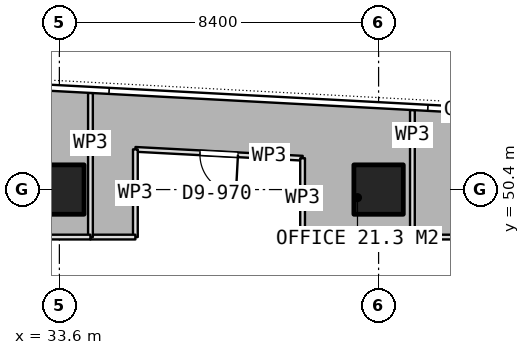
"""IFC4 building model, lengths in metres.
Left out: names, types, materials, properties, quantities, classifications, styles, units other than length and angle.
Written with IfcOpenShell. Run it as: python <this file> out.ifc"""

import sys

from ifc_helpers import new_model, si_unit, direction, frame, frame_2d, origin, origin_2d, place, context, subcontext, project, spatial, rectangle, extrude, element, fill, save


model = new_model("IFC4")
c1 = context("Model", 3, precision=1e-05, world=origin(), true_north=direction((0.0, 1.0)))
c2 = subcontext(c1, "Body", "Model", "MODEL_VIEW")
j1 = project(units=[si_unit("LENGTHUNIT", "METRE"), si_unit("PLANEANGLEUNIT", "RADIAN")], contexts=[c1])
p1 = place(None, origin())
s1 = spatial("IfcSite", under=j1, at=p1, CompositionType="ELEMENT")
p2 = place(p1, origin())
s2 = spatial("IfcBuilding", under=s1, at=p2, CompositionType="ELEMENT")
p3 = place(p2, frame((0.0, 0.0, 257.6)))
s3 = spatial("IfcBuildingStorey", under=s2, at=p3, CompositionType="ELEMENT", Elevation=257.6)
for number, where, z_axis, x_axis in (
    (1, (33.6, 50.4, 0.0), (0.0, 0.0, 1.0), (1.0, 0.0, 0.0)),
    (2, (42.0, 50.4, 0.0), (0.0, 0.0, 1.0), (1.0, 0.0, 0.0)),
):
    element("IfcColumn", number, at=place(p3, frame(where, z_axis=z_axis, x_axis=x_axis)), inside=s3, PredefinedType="COLUMN", context=c2, shape_type="SweptSolid", body=[
        extrude(rectangle(XDim=1.3, YDim=1.3, at=origin_2d()), origin(), (0.0, 0.0, 1.0), 3.75),
    ])
p4 = place(p3, frame((50.402, 49.15, 0.0), z_axis=(0.0, 0.0, 1.0), x_axis=(-1.0, 0.0, 0.0)))
e3 = element("IfcWall", 3, at=p4, inside=s3, PredefinedType="PARTITIONING", context=c2, shape_type="SweptSolid", body=[
    extrude(rectangle(XDim=7.512, YDim=0.125, at=frame_2d((3.756, 0.0))), origin(), (0.0, 0.0, 1.0), 3.5),
])
p5 = place(p4, frame((3.256, 0.0, 0.0)))
e4 = element("IfcOpeningElement", 4, at=p5, cuts=e3, PredefinedType="OPENING", context=c2, shape_type="SweptSolid", body=[
    extrude(rectangle(XDim=1.0, YDim=2.1, at=frame_2d((0.5, 1.05))), frame((0.0, 0.073, 0.0), z_axis=(0.0, -1.0, 0.0), x_axis=(1.0, 0.0, 0.0)), (0.0, 0.0, 1.0), 0.145),
])
p6 = place(p3, frame((42.89, 49.15, 0.0), z_axis=(0.0, 0.0, 1.0), x_axis=(0.0, 1.0, 0.0)))
e5 = element("IfcWall", 5, at=p6, inside=s3, PredefinedType="PARTITIONING", context=c2, shape_type="SweptSolid", body=[
    extrude(rectangle(XDim=3.343, YDim=0.125, at=frame_2d((1.671, 0.0))), origin(), (0.0, 0.0, 1.0), 3.5),
])
p7 = place(p3, frame((40.0, 51.225, 0.0), z_axis=(0.0, 0.0, 1.0), x_axis=(-0.998601864588, 0.052861290579, 0.0)))
e6 = element("IfcWall", 6, at=p7, inside=s3, PredefinedType="PARTITIONING", context=c2, shape_type="SweptSolid", body=[
    extrude(rectangle(XDim=4.406, YDim=0.125, at=frame_2d((2.203, 0.0))), origin(), (0.0, 0.0, 1.0), 3.5),
])
p8 = place(p7, frame((1.703, 0.0, 0.0)))
e7 = element("IfcOpeningElement", 7, at=p8, cuts=e6, PredefinedType="OPENING", context=c2, shape_type="SweptSolid", body=[
    extrude(rectangle(XDim=1.0, YDim=2.1, at=frame_2d((0.5, 1.05))), frame((0.0, 0.073, 0.0), z_axis=(0.0, -1.0, 0.0), x_axis=(1.0, 0.0, 0.0)), (0.0, 0.0, 1.0), 0.145),
])
p9 = place(p3, frame((35.6, 51.458, 0.0), z_axis=(0.0, 0.0, 1.0), x_axis=(0.0, -1.0, 0.0)))
e8 = element("IfcWall", 8, at=p9, inside=s3, PredefinedType="PARTITIONING", context=c2, shape_type="SweptSolid", body=[
    extrude(rectangle(XDim=2.308, YDim=0.125, at=frame_2d((1.154, 0.0))), origin(), (0.0, 0.0, 1.0), 3.5),
])
p10 = place(p3, frame((35.6, 49.15, 0.0), z_axis=(0.0, 0.0, 1.0), x_axis=(-1.0, 0.0, 0.0)))
e9 = element("IfcWall", 9, at=p10, inside=s3, PredefinedType="PARTITIONING", context=c2, shape_type="SweptSolid", body=[
    extrude(rectangle(XDim=1.182, YDim=0.125, at=frame_2d((0.591, 0.0))), origin(), (0.0, 0.0, 1.0), 3.5),
])
p11 = place(p3, frame((34.418, 49.15, 0.0), z_axis=(0.0, 0.0, 1.0), x_axis=(0.0, 1.0, 0.0)))
e10 = element("IfcWall", 10, at=p11, inside=s3, PredefinedType="PARTITIONING", context=c2, shape_type="SweptSolid", body=[
    extrude(rectangle(XDim=3.793, YDim=0.125, at=frame_2d((1.896, 0.0))), origin(), (0.0, 0.0, 1.0), 3.5),
])
p12 = place(p3, frame((42.889, 49.15, 0.0), z_axis=(0.0, 0.0, 1.0), x_axis=(-1.0, 0.0, 0.0)))
e11 = element("IfcWall", 11, at=p12, inside=s3, PredefinedType="PARTITIONING", context=c2, shape_type="SweptSolid", body=[
    extrude(rectangle(XDim=2.889, YDim=0.125, at=frame_2d((1.444, 0.0))), origin(), (0.0, 0.0, 1.0), 3.5),
])
p13 = place(p3, frame((40.0, 49.15, 0.0), z_axis=(0.0, 0.0, 1.0), x_axis=(0.0, 1.0, 0.0)))
e12 = element("IfcWall", 12, at=p13, inside=s3, PredefinedType="PARTITIONING", context=c2, shape_type="SweptSolid", body=[
    extrude(rectangle(XDim=2.075, YDim=0.125, at=frame_2d((1.038, 0.0))), origin(), (0.0, 0.0, 1.0), 3.5),
])
p14 = place(p3, frame((34.417, 49.15, 0.0), z_axis=(0.0, 0.0, 1.0), x_axis=(-1.0, 0.0, 0.0)))
e13 = element("IfcWall", 13, at=p14, inside=s3, PredefinedType="PARTITIONING", context=c2, shape_type="SweptSolid", body=[
    extrude(rectangle(XDim=9.211, YDim=0.125, at=frame_2d((4.605, 0.0))), origin(), (0.0, 0.0, 1.0), 3.5),
])
p15 = place(p14, frame((4.105, 0.0, 0.0)))
e14 = element("IfcOpeningElement", 14, at=p15, cuts=e13, PredefinedType="OPENING", context=c2, shape_type="SweptSolid", body=[
    extrude(rectangle(XDim=1.0, YDim=2.1, at=frame_2d((0.5, 1.05))), frame((0.0, 0.073, 0.0), z_axis=(0.0, -1.0, 0.0), x_axis=(1.0, 0.0, 0.0)), (0.0, 0.0, 1.0), 0.145),
])
p16 = place(p8, origin())
e15 = element("IfcDoor", 15, at=p16, inside=s3, OperationType="SINGLE_SWING_LEFT", PredefinedType="DOOR", context=c2, shape_type="SweptSolid", body=[
    extrude(rectangle(XDim=1.0, YDim=2.1, at=frame_2d((0.5, 1.05))), frame((0.0, 0.025, 0.0), z_axis=(0.0, -1.0, 0.0), x_axis=(1.0, 0.0, 0.0)), (0.0, 0.0, 1.0), 0.05),
])
fill(e7, e15)
save(model, sys.argv[1])
